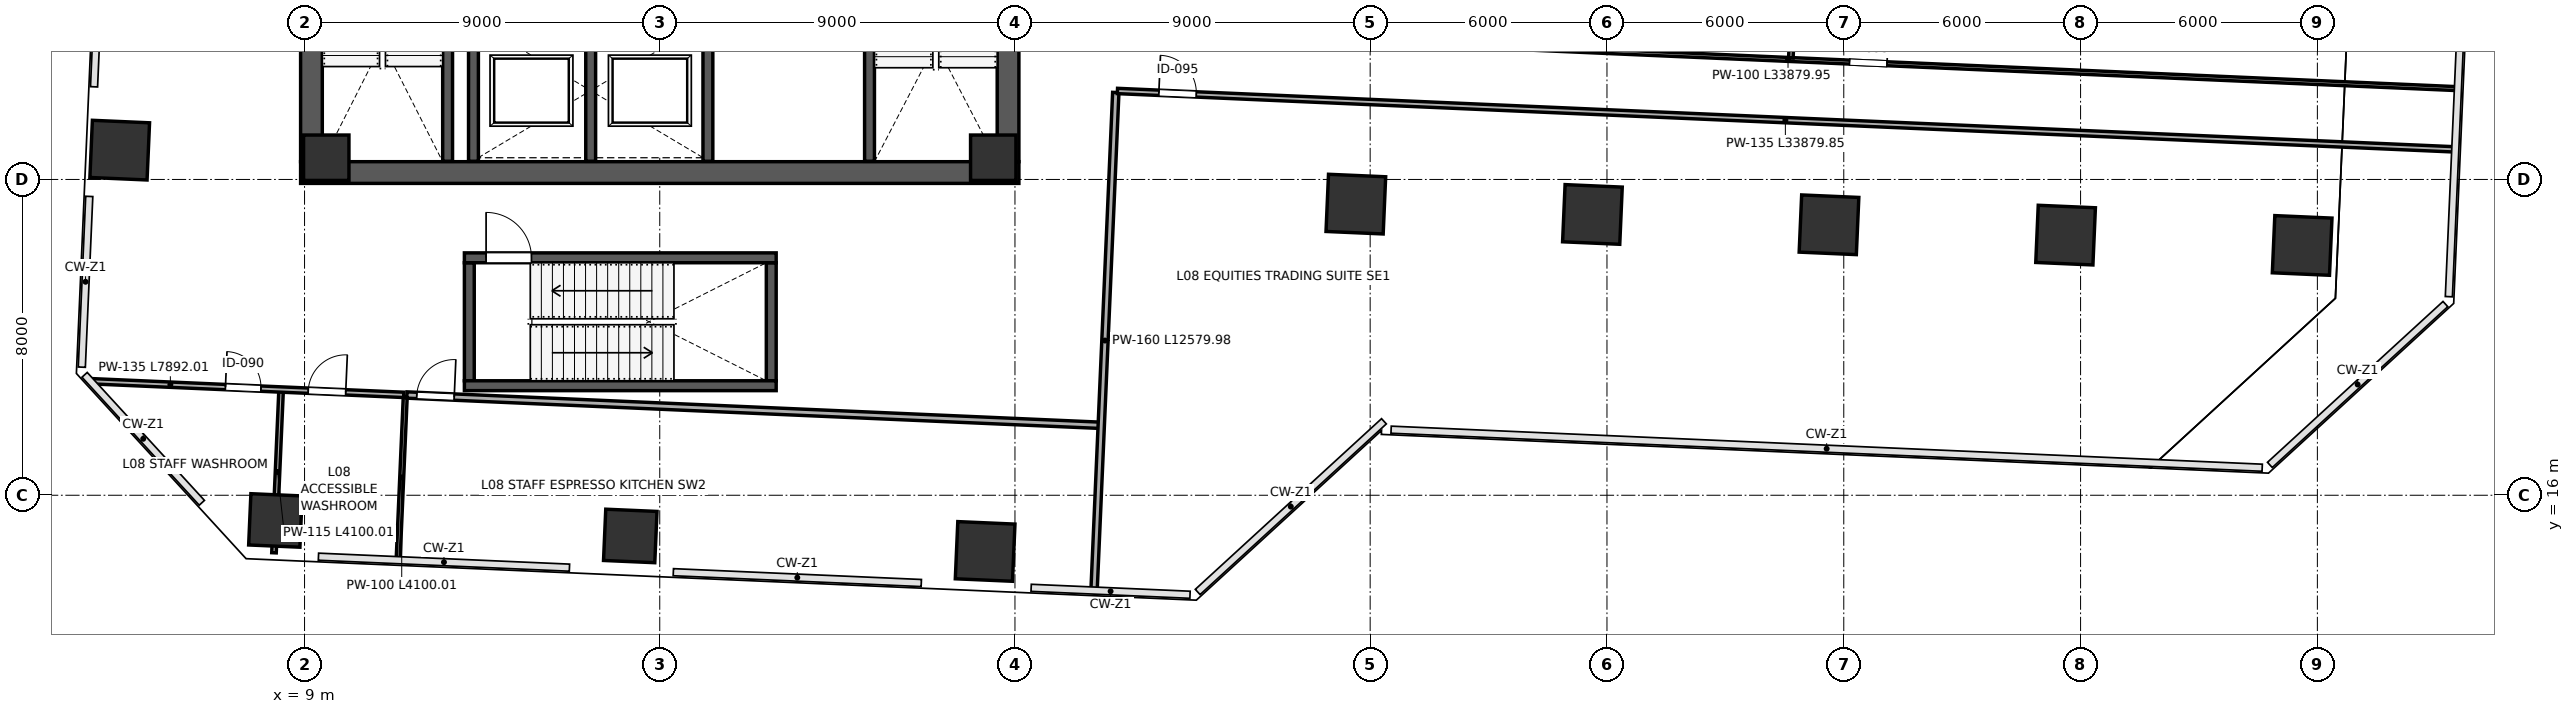
"""IFC4 building model, lengths in metres.
Left out: names, types, materials, properties, quantities, classifications, styles, units other than length and angle.
Written with IfcOpenShell. Run it as: python <this file> out.ifc"""

import sys

from ifc_helpers import new_model, si_unit, direction, frame, frame_2d, origin, origin_2d, place, context, subcontext, project, spatial, rectangle, extrude, clip, halfspace, source, transform, mapped, element, fill, save


model = new_model("IFC4")
c1 = context("Model", 3, precision=1e-05, world=origin(), true_north=direction((0.0, 1.0)))
c2 = subcontext(c1, "Body", "Model", "MODEL_VIEW")
j1 = project(units=[si_unit("LENGTHUNIT", "METRE"), si_unit("PLANEANGLEUNIT", "RADIAN")], contexts=[c1])
p1 = place(None, origin())
s1 = spatial("IfcSite", under=j1, at=p1, CompositionType="ELEMENT")
p2 = place(p1, origin())
s2 = spatial("IfcBuilding", under=s1, at=p2, CompositionType="ELEMENT")
p3 = place(p2, frame((0.0, 0.0, 37.6)))
s3 = spatial("IfcBuildingStorey", under=s2, at=p3, CompositionType="ELEMENT", Elevation=37.6)
m1 = source(origin(), c2, "Body", "SweptSolid", [
    extrude(rectangle(XDim=1.15, YDim=1.15, at=origin_2d()), origin(), (0.0, 0.0, 1.0), 4.798),
])
for number, where, z_axis, x_axis in (
    (1, (9.55, 24.55, 0.001), (0.0, 0.0, 1.0), (1.0, 0.0, 0.0)),
    (2, (26.45, 24.55, 0.001), (0.0, 0.0, 1.0), (1.0, 0.0, 0.0)),
):
    element("IfcColumn", number, at=place(p3, frame(where, z_axis=z_axis, x_axis=x_axis)), inside=s3, PredefinedType="COLUMN", context=c2, shape_type="MappedRepresentation", body=[
        mapped(m1, transform((0.0, 0.0, 0.0), scale=1.0)),
    ])
p4 = place(p3, frame((8.262, 15.362, 0.0), z_axis=(-0.074626848987, 0.0607039294, 0.995362178489), x_axis=(0.664109051, 0.747623943566, 0.004196115607)))
e3 = element("IfcColumn", 3, at=p4, inside=s3, PredefinedType="COLUMN", context=c2, shape_type="Clipping", body=[
    clip(clip(extrude(rectangle(XDim=1.3, YDim=1.3, at=origin_2d()), origin(), (0.0, 0.0, 1.0), 4.822), halfspace(frame((0.0, 0.0, 0.066), z_axis=(0.0, 0.0, -1.0), x_axis=(1.0, 0.0, 0.0)), False)), halfspace(frame((0.0, 0.0, 4.756), z_axis=(0.0, 0.0, 1.0), x_axis=(1.0, 0.0, 0.0)), False)),
])
p5 = place(p3, frame((17.253, 14.969, 0.0), z_axis=(-0.076967956371, 0.020078597314, 0.996831371708), x_axis=(0.294254782168, 0.955720714794, 0.003469651896)))
e4 = element("IfcColumn", 4, at=p5, inside=s3, PredefinedType="COLUMN", context=c2, shape_type="Clipping", body=[
    clip(clip(extrude(rectangle(XDim=1.3, YDim=1.3, at=origin_2d()), origin(), (0.0, 0.0, 1.0), 4.815), halfspace(frame((0.0, 0.0, 0.055), z_axis=(0.0, 0.0, -1.0), x_axis=(1.0, 0.0, 0.0)), False)), halfspace(frame((0.0, 0.0, 4.76), z_axis=(0.0, 0.0, 1.0), x_axis=(1.0, 0.0, 0.0)), False)),
])
p6 = place(p3, frame((26.244, 14.576, 0.0), z_axis=(-0.079133843412, -0.020632590819, 0.996650455788), x_axis=(-0.209988663443, 0.977697313357, 0.003567166984)))
e5 = element("IfcColumn", 5, at=p6, inside=s3, PredefinedType="COLUMN", context=c2, shape_type="Clipping", body=[
    clip(clip(extrude(rectangle(XDim=1.45, YDim=1.45, at=origin_2d()), origin(), (0.0, 0.0, 1.0), 4.816), halfspace(frame((0.0, 0.0, 0.063), z_axis=(0.0, 0.0, -1.0), x_axis=(1.0, 0.0, 0.0)), False)), halfspace(frame((0.0, 0.0, 4.753), z_axis=(0.0, 0.0, 1.0), x_axis=(1.0, 0.0, 0.0)), False)),
])
p7 = place(p3, frame((35.637, 23.375, 0.0), z_axis=(-0.03976557291, -0.063604628099, 0.997182606394), x_axis=(-0.824056903423, 0.566497585159, 0.003271991837)))
e6 = element("IfcColumn", 6, at=p7, inside=s3, PredefinedType="COLUMN", context=c2, shape_type="Clipping", body=[
    clip(clip(extrude(rectangle(XDim=1.45, YDim=1.45, at=origin_2d()), origin(), (0.0, 0.0, 1.0), 4.813), halfspace(frame((0.0, 0.0, 0.058), z_axis=(0.0, 0.0, -1.0), x_axis=(1.0, 0.0, 0.0)), False)), halfspace(frame((0.0, 0.0, 4.756), z_axis=(0.0, 0.0, 1.0), x_axis=(1.0, 0.0, 0.0)), False)),
])
p8 = place(p3, frame((41.632, 23.113, 0.0), z_axis=(-0.041198493799, -0.090545584038, 0.995039788812), x_axis=(-0.891368005609, 0.453259583779, 0.00433915762)))
e7 = element("IfcColumn", 7, at=p8, inside=s3, PredefinedType="COLUMN", context=c2, shape_type="Clipping", body=[
    clip(clip(extrude(rectangle(XDim=1.45, YDim=1.45, at=origin_2d()), origin(), (0.0, 0.0, 1.0), 4.824), halfspace(frame((0.0, 0.0, 0.076), z_axis=(0.0, 0.0, -1.0), x_axis=(1.0, 0.0, 0.0)), False)), halfspace(frame((0.0, 0.0, 4.747), z_axis=(0.0, 0.0, 1.0), x_axis=(1.0, 0.0, 0.0)), False)),
])
p9 = place(p3, frame((47.626, 22.852, 0.0), z_axis=(-0.042543403024, -0.11738547501, 0.992174737189), x_axis=(-0.924517477509, 0.38110073839, 0.005446189418)))
e8 = element("IfcColumn", 8, at=p9, inside=s3, PredefinedType="COLUMN", context=c2, shape_type="Clipping", body=[
    clip(clip(extrude(rectangle(XDim=1.45, YDim=1.45, at=origin_2d()), origin(), (0.0, 0.0, 1.0), 4.838), halfspace(frame((0.0, 0.0, 0.096), z_axis=(0.0, 0.0, -1.0), x_axis=(1.0, 0.0, 0.0)), False)), halfspace(frame((0.0, 0.0, 4.742), z_axis=(0.0, 0.0, 1.0), x_axis=(1.0, 0.0, 0.0)), False)),
])
p10 = place(p3, frame((53.62, 22.59, 0.0), z_axis=(-0.043849484019, -0.14386854791, 0.988624834643), x_axis=(-0.943073487423, 0.332519710053, 0.006560468435)))
e9 = element("IfcColumn", 9, at=p10, inside=s3, PredefinedType="COLUMN", context=c2, shape_type="Clipping", body=[
    clip(clip(extrude(rectangle(XDim=1.45, YDim=1.45, at=origin_2d()), origin(), (0.0, 0.0, 1.0), 4.855), halfspace(frame((0.0, 0.0, 0.116), z_axis=(0.0, 0.0, -1.0), x_axis=(1.0, 0.0, 0.0)), False)), halfspace(frame((0.0, 0.0, 4.739), z_axis=(0.0, 0.0, 1.0), x_axis=(1.0, 0.0, 0.0)), False)),
])
p11 = place(p3, frame((59.615, 22.328, 0.0), z_axis=(-0.045163906243, -0.170090675728, 0.984392901033), x_axis=(-0.954568816034, 0.29789167357, 0.007676345018)))
e10 = element("IfcColumn", 10, at=p11, inside=s3, PredefinedType="COLUMN", context=c2, shape_type="Clipping", body=[
    clip(clip(extrude(rectangle(XDim=1.45, YDim=1.45, at=origin_2d()), origin(), (0.0, 0.0, 1.0), 4.876), halfspace(frame((0.0, 0.0, 0.136), z_axis=(0.0, 0.0, -1.0), x_axis=(1.0, 0.0, 0.0)), False)), halfspace(frame((0.0, 0.0, 4.74), z_axis=(0.0, 0.0, 1.0), x_axis=(1.0, 0.0, 0.0)), False)),
])
p12 = place(p3, frame((4.317, 24.743, 0.0), z_axis=(-0.032031619673, 0.078153097366, 0.996426649941), x_axis=(0.940900672719, 0.338662591226, 0.003684206993)))
e11 = element("IfcColumn", 11, at=p12, inside=s3, PredefinedType="COLUMN", context=c2, shape_type="Clipping", body=[
    clip(clip(extrude(rectangle(XDim=1.45, YDim=1.45, at=origin_2d()), origin(), (0.0, 0.0, 1.0), 4.817), halfspace(frame((0.0, 0.0, 0.065), z_axis=(0.0, 0.0, -1.0), x_axis=(1.0, 0.0, 0.0)), False)), halfspace(frame((0.0, 0.0, 4.752), z_axis=(0.0, 0.0, 1.0), x_axis=(1.0, 0.0, 0.0)), False)),
])
p13 = place(p3, frame((9.175, 24.45, 0.0), z_axis=(0.0, 0.0, 1.0), x_axis=(0.0, 1.0, 0.0)))
e12 = element("IfcWall", 12, at=p13, inside=s3, PredefinedType="SHEAR", context=c2, shape_type="SweptSolid", body=[
    extrude(rectangle(XDim=15.1, YDim=0.55, at=frame_2d((7.55, 0.0))), origin(), (0.0, 0.0, 1.0), 4.56),
])
p14 = place(p3, frame((26.825, 24.45, 0.0), z_axis=(0.0, 0.0, 1.0), x_axis=(0.0, 1.0, 0.0)))
e13 = element("IfcWall", 13, at=p14, inside=s3, PredefinedType="SHEAR", context=c2, shape_type="SweptSolid", body=[
    extrude(rectangle(XDim=15.1, YDim=0.55, at=frame_2d((7.55, 0.0))), origin(), (0.0, 0.0, 1.0), 4.56),
])
p15 = place(p14, frame((8.6, 0.0, 0.0)))
e14 = element("IfcOpeningElement", 14, at=p15, cuts=e13, PredefinedType="OPENING", context=c2, shape_type="SweptSolid", body=[
    extrude(rectangle(XDim=1.15, YDim=2.2, at=frame_2d((0.575, 1.1))), frame((0.0, 0.285, 0.0), z_axis=(0.0, -1.0, 0.0), x_axis=(1.0, 0.0, 0.0)), (0.0, 0.0, 1.0), 0.57),
])
p16 = place(p3, frame((8.9, 24.175, 0.0), z_axis=(0.0, 0.0, 1.0), x_axis=(1.0, 0.0, 0.0)))
e15 = element("IfcWall", 15, at=p16, inside=s3, PredefinedType="SHEAR", context=c2, shape_type="SweptSolid", body=[
    extrude(rectangle(XDim=18.2, YDim=0.55, at=frame_2d((9.1, 0.0))), origin(), (0.0, 0.0, 1.0), 4.56),
])
p17 = place(p3, frame((12.625, 24.46, 0.0), z_axis=(0.0, 0.0, 1.0), x_axis=(0.0, 1.0, 0.0)))
e16 = element("IfcWall", 16, at=p17, inside=s3, PredefinedType="SHEAR", context=c2, shape_type="SweptSolid", body=[
    extrude(rectangle(XDim=7.49, YDim=0.25, at=frame_2d((3.745, 0.0))), origin(), (0.0, 0.0, 1.0), 4.56),
])
p18 = place(p17, frame((5.85, 0.0, 0.0)))
e17 = element("IfcOpeningElement", 17, at=p18, cuts=e16, PredefinedType="OPENING", context=c2, shape_type="SweptSolid", body=[
    extrude(rectangle(XDim=1.15, YDim=2.2, at=frame_2d((0.575, 1.1))), frame((0.0, 0.135, 0.0), z_axis=(0.0, -1.0, 0.0), x_axis=(1.0, 0.0, 0.0)), (0.0, 0.0, 1.0), 0.27),
])
p19 = place(p3, frame((23.315, 24.46, 0.0), z_axis=(0.0, 0.0, 1.0), x_axis=(0.0, 1.0, 0.0)))
e18 = element("IfcWall", 18, at=p19, inside=s3, PredefinedType="SHEAR", context=c2, shape_type="SweptSolid", body=[
    extrude(rectangle(XDim=7.49, YDim=0.25, at=frame_2d((3.745, 0.0))), origin(), (0.0, 0.0, 1.0), 4.56),
])
for number, where, z_axis, x_axis in (
    (19, (13.28, 24.46, 0.0), (0.0, 0.0, 1.0), (0.0, 1.0, 0.0)),
    (20, (16.25, 24.46, 0.0), (0.0, 0.0, 1.0), (0.0, 1.0, 0.0)),
    (21, (19.22, 24.46, 0.0), (0.0, 0.0, 1.0), (0.0, 1.0, 0.0)),
):
    element("IfcWall", number, at=place(p3, frame(where, z_axis=z_axis, x_axis=x_axis)), inside=s3, PredefinedType="SHEAR", context=c2, shape_type="SweptSolid", body=[
        extrude(rectangle(XDim=3.49, YDim=0.25, at=frame_2d((1.745, 0.0))), origin(), (0.0, 0.0, 1.0), 4.56),
    ])
for number, where, z_axis, x_axis in (
    (22, (13.175, 18.9, 0.0), (0.0, 0.0, 1.0), (0.0, 1.0, 0.0)),
    (23, (20.825, 18.9, 0.0), (0.0, 0.0, 1.0), (0.0, 1.0, 0.0)),
):
    element("IfcWall", number, at=place(p3, frame(where, z_axis=z_axis, x_axis=x_axis)), inside=s3, PredefinedType="SHEAR", context=c2, shape_type="SweptSolid", body=[
        extrude(rectangle(XDim=2.99, YDim=0.25, at=frame_2d((1.495, 0.0))), origin(), (0.0, 0.0, 1.0), 4.56),
    ])
p20 = place(p3, frame((13.05, 18.775, 0.0), z_axis=(0.0, 0.0, 1.0), x_axis=(1.0, 0.0, 0.0)))
e24 = element("IfcWall", 24, at=p20, inside=s3, PredefinedType="SHEAR", context=c2, shape_type="SweptSolid", body=[
    extrude(rectangle(XDim=7.9, YDim=0.25, at=frame_2d((3.95, 0.0))), origin(), (0.0, 0.0, 1.0), 4.56),
])
p21 = place(p3, frame((13.05, 22.015, 0.0), z_axis=(0.0, 0.0, 1.0), x_axis=(1.0, 0.0, 0.0)))
e25 = element("IfcWall", 25, at=p21, inside=s3, PredefinedType="SHEAR", context=c2, shape_type="SweptSolid", body=[
    extrude(rectangle(XDim=7.9, YDim=0.25, at=frame_2d((3.95, 0.0))), origin(), (0.0, 0.0, 1.0), 4.56),
])
p22 = place(p21, frame((0.55, 0.0, 0.0)))
e26 = element("IfcOpeningElement", 26, at=p22, cuts=e25, PredefinedType="OPENING", context=c2, shape_type="SweptSolid", body=[
    extrude(rectangle(XDim=1.15, YDim=2.2, at=frame_2d((0.575, 1.1))), frame((0.0, 0.135, 0.0), z_axis=(0.0, -1.0, 0.0), x_axis=(1.0, 0.0, 0.0)), (0.0, 0.0, 1.0), 0.27),
])
p23 = place(p3, frame((8.226, 14.542, 0.0), z_axis=(0.0, 0.0, 1.0), x_axis=(0.043649126443, 0.999046922702, 0.0)))
e27 = element("IfcWall", 27, at=p23, inside=s3, PredefinedType="PARTITIONING", context=c2, shape_type="SweptSolid", body=[
    extrude(rectangle(XDim=4.1, YDim=0.115, at=frame_2d((2.05, 0.0))), origin(), (0.0, 0.0, 1.0), 3.695),
])
p24 = place(p3, frame((11.373, 14.405, 0.0), z_axis=(0.0, 0.0, 1.0), x_axis=(0.04364652983, 0.999047036147, 0.0)))
e28 = element("IfcWall", 28, at=p24, inside=s3, PredefinedType="PARTITIONING", context=c2, shape_type="SweptSolid", body=[
    extrude(rectangle(XDim=4.1, YDim=0.1, at=frame_2d((2.05, 0.0))), origin(), (0.0, 0.0, 1.0), 3.695),
])
p25 = place(p3, frame((3.629, 18.887, 0.0), z_axis=(0.0, 0.0, 1.0), x_axis=(0.999046913697, -0.043649332566, 0.0)))
e29 = element("IfcWall", 29, at=p25, inside=s3, PredefinedType="PARTITIONING", context=c2, shape_type="SweptSolid", body=[
    extrude(rectangle(XDim=7.892, YDim=0.135, at=frame_2d((3.946, 0.0))), origin(), (0.0, 0.0, 1.0), 4.56),
])
p26 = place(p25, frame((3.37, 0.0, 0.0)))
e30 = element("IfcOpeningElement", 30, at=p26, cuts=e29, PredefinedType="OPENING", context=c2, shape_type="SweptSolid", body=[
    extrude(rectangle(XDim=0.9, YDim=2.15, at=frame_2d((0.45, 1.075))), frame((0.0, 0.078, 0.0), z_axis=(0.0, -1.0, 0.0), x_axis=(1.0, 0.0, 0.0)), (0.0, 0.0, 1.0), 0.155),
])
p27 = place(p25, frame((5.47, 0.0, 0.0)))
e31 = element("IfcOpeningElement", 31, at=p27, cuts=e29, PredefinedType="OPENING", context=c2, shape_type="SweptSolid", body=[
    extrude(rectangle(XDim=0.95, YDim=2.15, at=frame_2d((0.475, 1.075))), frame((0.0, 0.078, 0.0), z_axis=(0.0, -1.0, 0.0), x_axis=(1.0, 0.0, 0.0)), (0.0, 0.0, 1.0), 0.155),
])
p28 = place(p3, frame((11.594, 18.539, 0.0), z_axis=(0.0, 0.0, 1.0), x_axis=(0.999048303008, -0.043617522367, 0.0)))
e32 = element("IfcWall", 32, at=p28, inside=s3, PredefinedType="PARTITIONING", context=c2, shape_type="SweptSolid", body=[
    extrude(rectangle(XDim=17.57, YDim=0.16, at=frame_2d((8.785, 0.0))), origin(), (0.0, 0.0, 1.0), 4.56),
])
p29 = place(p28, frame((0.25, 0.0, 0.0)))
e33 = element("IfcOpeningElement", 33, at=p29, cuts=e32, PredefinedType="OPENING", context=c2, shape_type="SweptSolid", body=[
    extrude(rectangle(XDim=0.95, YDim=2.15, at=frame_2d((0.475, 1.075))), frame((0.0, 0.09, 0.0), z_axis=(0.0, -1.0, 0.0), x_axis=(1.0, 0.0, 0.0)), (0.0, 0.0, 1.0), 0.18),
])
p30 = place(p3, frame((29.006, 13.635, 0.0), z_axis=(0.0, 0.0, 1.0), x_axis=(0.043626715414, 0.999047901605, 0.0)))
e34 = element("IfcWall", 34, at=p30, inside=s3, PredefinedType="PARTITIONING", context=c2, shape_type="SweptSolid", body=[
    extrude(rectangle(XDim=12.58, YDim=0.16, at=frame_2d((6.29, 0.0))), origin(), (0.0, 0.0, 1.0), 4.56),
])
p31 = place(p3, frame((29.664, 27.78, 0.0), z_axis=(0.0, 0.0, 1.0), x_axis=(0.999048269666, -0.043618286038, 0.0)))
e35 = element("IfcWall", 35, at=p31, inside=s3, PredefinedType="PARTITIONING", context=c2, shape_type="SweptSolid", body=[
    extrude(rectangle(XDim=33.88, YDim=0.1, at=frame_2d((16.94, 0.0))), origin(), (0.0, 0.0, 1.0), 3.695),
])
p32 = place(p31, frame((1.05, 0.0, 0.0)))
e36 = element("IfcOpeningElement", 36, at=p32, cuts=e35, PredefinedType="OPENING", context=c2, shape_type="SweptSolid", body=[
    extrude(rectangle(XDim=0.95, YDim=2.15, at=frame_2d((0.475, 1.075))), frame((0.0, 0.06, 0.0), z_axis=(0.0, -1.0, 0.0), x_axis=(1.0, 0.0, 0.0)), (0.0, 0.0, 1.0), 0.12),
])
p33 = place(p31, frame((18.5, 0.0, 0.0)))
e37 = element("IfcOpeningElement", 37, at=p33, cuts=e35, PredefinedType="OPENING", context=c2, shape_type="SweptSolid", body=[
    extrude(rectangle(XDim=0.95, YDim=2.15, at=frame_2d((0.475, 1.075))), frame((0.0, 0.06, 0.0), z_axis=(0.0, -1.0, 0.0), x_axis=(1.0, 0.0, 0.0)), (0.0, 0.0, 1.0), 0.12),
])
p34 = place(p3, frame((29.597, 26.241, 0.0), z_axis=(0.0, 0.0, 1.0), x_axis=(0.999047941909, -0.043625792456, 0.0)))
e38 = element("IfcWall", 38, at=p34, inside=s3, PredefinedType="PARTITIONING", context=c2, shape_type="SweptSolid", body=[
    extrude(rectangle(XDim=33.88, YDim=0.135, at=frame_2d((16.94, 0.0))), origin(), (0.0, 0.0, 1.0), 3.695),
])
p35 = place(p34, frame((1.05, 0.0, 0.0)))
e39 = element("IfcOpeningElement", 39, at=p35, cuts=e38, PredefinedType="OPENING", context=c2, shape_type="SweptSolid", body=[
    extrude(rectangle(XDim=0.95, YDim=2.15, at=frame_2d((0.475, 1.075))), frame((0.0, 0.078, 0.0), z_axis=(0.0, -1.0, 0.0), x_axis=(1.0, 0.0, 0.0)), (0.0, 0.0, 1.0), 0.155),
])
p36 = place(p3, frame((46.659, 27.078, 0.0), z_axis=(0.0, 0.0, 1.0), x_axis=(0.043623060059, 0.999048061222, 0.0)))
e40 = element("IfcWall", 40, at=p36, inside=s3, PredefinedType="PARTITIONING", context=c2, shape_type="SweptSolid", body=[
    extrude(rectangle(XDim=19.84, YDim=0.115, at=frame_2d((9.92, 0.0))), origin(), (0.0, 0.0, 1.0), 3.923),
])
m2 = source(origin(), c2, "Body", "SweptSolid", [
    extrude(rectangle(XDim=1.15, YDim=2.2, at=frame_2d((0.575, 1.1))), frame((0.0, 0.025, 0.0), z_axis=(0.0, -1.0, 0.0), x_axis=(1.0, 0.0, 0.0)), (0.0, 0.0, 1.0), 0.05),
])
p37 = place(p22, origin())
e41 = element("IfcDoor", 41, at=p37, inside=s3, OperationType="SINGLE_SWING_LEFT", PredefinedType="DOOR", context=c2, shape_type="MappedRepresentation", body=[
    mapped(m2, transform((0.0, 0.0, 0.0), scale=1.0)),
])
fill(e26, e41)
m3 = source(origin(), c2, "Body", "SweptSolid", [
    extrude(rectangle(XDim=0.9, YDim=2.15, at=frame_2d((0.45, 1.075))), frame((0.0, 0.025, 0.0), z_axis=(0.0, -1.0, 0.0), x_axis=(1.0, 0.0, 0.0)), (0.0, 0.0, 1.0), 0.05),
])
p38 = place(p26, origin())
e42 = element("IfcDoor", 42, at=p38, inside=s3, OperationType="SINGLE_SWING_LEFT", PredefinedType="DOOR", context=c2, shape_type="MappedRepresentation", body=[
    mapped(m3, transform((0.0, 0.0, 0.0), scale=1.0)),
])
fill(e30, e42)
m4 = source(origin(), c2, "Body", "SweptSolid", [
    extrude(rectangle(XDim=0.95, YDim=2.15, at=frame_2d((0.475, 1.075))), frame((0.0, 0.025, 0.0), z_axis=(0.0, -1.0, 0.0), x_axis=(1.0, 0.0, 0.0)), (0.0, 0.0, 1.0), 0.05),
])
p39 = place(p27, origin())
e43 = element("IfcDoor", 43, at=p39, inside=s3, OperationType="SINGLE_SWING_RIGHT", PredefinedType="DOOR", context=c2, shape_type="MappedRepresentation", body=[
    mapped(m4, transform((0.0, 0.0, 0.0), scale=1.0)),
])
fill(e31, e43)
m5 = source(origin(), c2, "Body", "SweptSolid", [
    extrude(rectangle(XDim=0.95, YDim=2.15, at=frame_2d((0.475, 1.075))), frame((0.0, 0.025, 0.0), z_axis=(0.0, -1.0, 0.0), x_axis=(1.0, 0.0, 0.0)), (0.0, 0.0, 1.0), 0.05),
])
p40 = place(p29, origin())
e44 = element("IfcDoor", 44, at=p40, inside=s3, OperationType="SINGLE_SWING_RIGHT", PredefinedType="DOOR", context=c2, shape_type="MappedRepresentation", body=[
    mapped(m5, transform((0.0, 0.0, 0.0), scale=1.0)),
])
fill(e33, e44)
p41 = place(p33, origin())
e45 = element("IfcDoor", 45, at=p41, inside=s3, OperationType="SINGLE_SWING_RIGHT", PredefinedType="DOOR", context=c2, shape_type="MappedRepresentation", body=[
    mapped(m4, transform((0.0, 0.0, 0.0), scale=1.0)),
])
fill(e37, e45)
p42 = place(p35, origin())
e46 = element("IfcDoor", 46, at=p42, inside=s3, OperationType="SINGLE_SWING_LEFT", PredefinedType="DOOR", context=c2, shape_type="MappedRepresentation", body=[
    mapped(m4, transform((0.0, 0.0, 0.0), scale=1.0)),
])
fill(e39, e46)
save(model, sys.argv[1])
